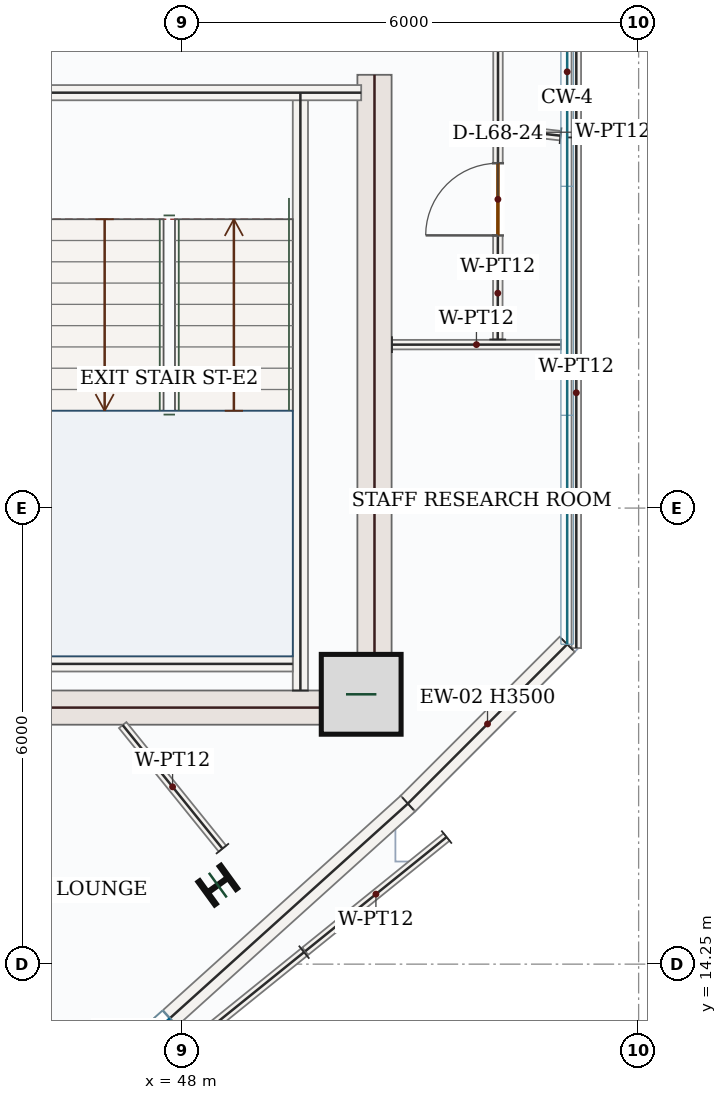
"""IFC4 building model, lengths in metres.
Left out: names, types, materials, properties, quantities, classifications, styles, units other than length and angle.
Written with IfcOpenShell. Run it as: python <this file> out.ifc"""

import sys

from ifc_helpers import new_model, si_unit, direction, frame, frame_2d, origin, origin_2d, place, context, subcontext, project, spatial, rectangle, i_section, extrude, source, transform, mapped, element, fill, save


model = new_model("IFC4")
c1 = context("Model", 3, precision=1e-05, world=origin(), true_north=direction((0.0, 1.0)))
c2 = subcontext(c1, "Body", "Model", "MODEL_VIEW")
j1 = project(units=[si_unit("LENGTHUNIT", "METRE"), si_unit("PLANEANGLEUNIT", "RADIAN")], contexts=[c1])
p1 = place(None, origin())
s1 = spatial("IfcSite", under=j1, at=p1, CompositionType="ELEMENT")
p2 = place(p1, origin())
s2 = spatial("IfcBuilding", under=s1, at=p2, CompositionType="ELEMENT")
p3 = place(p2, frame((0.0, 0.0, 284.1)))
s3 = spatial("IfcBuildingStorey", under=s2, at=p3, CompositionType="ELEMENT", Elevation=284.1)
m1 = source(origin(), c2, "Body", "SweptSolid", [
    extrude(rectangle(XDim=8.55, YDim=0.45, at=frame_2d((4.275, 0.0))), origin(), (0.0, 0.0, 1.0), 3.5),
])
p4 = place(p3, frame((50.525, 17.4, 0.0), z_axis=(0.0, 0.0, 1.0), x_axis=(0.0, 1.0, 0.0)))
e1 = element("IfcWall", 1, at=p4, inside=s3, PredefinedType="SHEAR", context=c2, shape_type="MappedRepresentation", body=[
    mapped(m1, transform((0.0, 0.0, 0.0), x_axis=(1.0, 0.0, 0.0), y_axis=(0.0, 1.0, 0.0), z_axis=(0.0, 0.0, 1.0), scale=1.0)),
])
m2 = source(origin(), c2, "Body", "SweptSolid", [
    extrude(rectangle(XDim=7.1, YDim=0.45, at=frame_2d((3.55, 0.0))), origin(), (0.0, 0.0, 1.0), 3.5),
])
p5 = place(p3, frame((43.2, 17.625, 0.0), z_axis=(0.0, 0.0, 1.0), x_axis=(1.0, 0.0, 0.0)))
e2 = element("IfcWall", 2, at=p5, inside=s3, PredefinedType="SHEAR", context=c2, shape_type="MappedRepresentation", body=[
    mapped(m2, transform((0.0, 0.0, 0.0), x_axis=(1.0, 0.0, 0.0), y_axis=(0.0, 1.0, 0.0), z_axis=(0.0, 0.0, 1.0), scale=1.0)),
])
m3 = source(origin(), c2, "Body", "SweptSolid", [
    extrude(rectangle(XDim=1.05, YDim=1.05, at=origin_2d()), origin(), (0.0, 0.0, 1.0), 3.75),
])
p6 = place(p3, frame((50.35, 17.8, 0.0), z_axis=(0.0, 0.0, 1.0), x_axis=(1.0, 0.0, 0.0)))
e3 = element("IfcColumn", 3, at=p6, inside=s3, PredefinedType="COLUMN", context=c2, shape_type="MappedRepresentation", body=[
    mapped(m3, transform((0.0, 0.0, 0.0), x_axis=(1.0, 0.0, 0.0), y_axis=(0.0, 1.0, 0.0), z_axis=(0.0, 0.0, 1.0), scale=1.0)),
])
m4 = source(origin(), c2, "Body", "SweptSolid", [
    extrude(i_section(OverallWidth=0.374, OverallDepth=0.372, WebThickness=0.016, FlangeThickness=0.026, FilletRadius=0.018, at=origin_2d()), origin(), (0.0, 0.0, 1.0), 3.75),
])
p7 = place(p3, frame((48.464, 15.289, 0.0), z_axis=(0.0, 0.0, 1.0), x_axis=(-0.587785252292, 0.809016994375, 0.0)))
e4 = element("IfcColumn", 4, at=p7, inside=s3, PredefinedType="COLUMN", context=c2, shape_type="MappedRepresentation", body=[
    mapped(m4, transform((0.0, 0.0, 0.0), x_axis=(1.0, 0.0, 0.0), y_axis=(0.0, 1.0, 0.0), z_axis=(0.0, 0.0, 1.0), scale=1.0)),
])
m5 = source(origin(), c2, "Body", "SweptSolid", [
    extrude(rectangle(XDim=2.964, YDim=0.28, at=frame_2d((1.482, 0.0))), origin(), (0.0, 0.0, 1.0), 3.5),
])
p8 = place(p3, frame((53.06, 18.458, 0.0), z_axis=(0.0, 0.0, 1.0), x_axis=(-0.707106781187, -0.707106781187, 0.0)))
e5 = element("IfcWall", 5, at=p8, inside=s3, PredefinedType="SOLIDWALL", context=c2, shape_type="MappedRepresentation", body=[
    mapped(m5, transform((0.0, 0.0, 0.0), x_axis=(1.0, 0.0, 0.0), y_axis=(0.0, 1.0, 0.0), z_axis=(0.0, 0.0, 1.0), scale=1.0)),
])
p9 = place(p3, frame((50.964, 16.362, 0.0), z_axis=(0.0, 0.0, 1.0), x_axis=(-0.742587457262, -0.669749108486, 0.0)))
e6 = element("IfcWall", 6, at=p9, inside=s3, PredefinedType="SOLIDWALL", context=c2, shape_type="SweptSolid", body=[
    extrude(rectangle(XDim=9.935, YDim=0.28, at=frame_2d((4.967, 0.0))), origin(), (0.0, 0.0, 1.0), 3.5),
])
p10 = place(p9, frame((4.217, 0.0, 0.85)))
e7 = element("IfcOpeningElement", 7, at=p10, cuts=e6, PredefinedType="OPENING", context=c2, shape_type="SweptSolid", body=[
    extrude(rectangle(XDim=1.5, YDim=1.5, at=frame_2d((0.75, 0.75))), frame((0.0, 0.15, 0.0), z_axis=(0.0, -1.0, 0.0), x_axis=(1.0, 0.0, 0.0)), (0.0, 0.0, 1.0), 0.3),
])
m6 = source(origin(), c2, "Body", "SweptSolid", [
    extrude(rectangle(XDim=7.87, YDim=0.2, at=frame_2d((3.935, 0.0))), origin(), (0.0, 0.0, 1.0), 3.5),
])
p11 = place(p3, frame((49.55, 17.85, 0.0), z_axis=(0.0, 0.0, 1.0), x_axis=(0.0, 1.0, 0.0)))
e8 = element("IfcWall", 8, at=p11, inside=s3, PredefinedType="SOLIDWALL", context=c2, shape_type="MappedRepresentation", body=[
    mapped(m6, transform((0.0, 0.0, 0.0), x_axis=(1.0, 0.0, 0.0), y_axis=(0.0, 1.0, 0.0), z_axis=(0.0, 0.0, 1.0), scale=1.0)),
])
m7 = source(origin(), c2, "Body", "SweptSolid", [
    extrude(rectangle(XDim=4.25, YDim=0.2, at=frame_2d((2.125, 0.0))), origin(), (0.0, 0.0, 1.0), 3.5),
])
p12 = place(p3, frame((46.1, 25.715, 0.0), z_axis=(0.0, 0.0, 1.0), x_axis=(1.0, 0.0, 0.0)))
e9 = element("IfcWall", 9, at=p12, inside=s3, PredefinedType="SOLIDWALL", context=c2, shape_type="MappedRepresentation", body=[
    mapped(m7, transform((0.0, 0.0, 0.0), x_axis=(1.0, 0.0, 0.0), y_axis=(0.0, 1.0, 0.0), z_axis=(0.0, 0.0, 1.0), scale=1.0)),
])
m8 = source(origin(), c2, "Body", "SweptSolid", [
    extrude(rectangle(XDim=3.25, YDim=0.2, at=frame_2d((1.625, 0.0))), origin(), (0.0, 0.0, 1.0), 3.5),
])
p13 = place(p3, frame((46.2, 18.2, 0.0), z_axis=(0.0, 0.0, 1.0), x_axis=(1.0, 0.0, 0.0)))
e10 = element("IfcWall", 10, at=p13, inside=s3, PredefinedType="SOLIDWALL", context=c2, shape_type="MappedRepresentation", body=[
    mapped(m8, transform((0.0, 0.0, 0.0), x_axis=(1.0, 0.0, 0.0), y_axis=(0.0, 1.0, 0.0), z_axis=(0.0, 0.0, 1.0), scale=1.0)),
])
m9 = source(origin(), c2, "Body", "SweptSolid", [
    extrude(rectangle(XDim=7.014, YDim=0.125, at=frame_2d((3.507, 0.0))), origin(), (0.0, 0.0, 1.0), 3.5),
])
p14 = place(p3, frame((53.18, 32.14, 0.0), z_axis=(0.0, 0.0, 1.0), x_axis=(0.0, -1.0, 0.0)))
e11 = element("IfcWall", 11, at=p14, inside=s3, PredefinedType="PARTITIONING", context=c2, shape_type="MappedRepresentation", body=[
    mapped(m9, transform((0.0, 0.0, 0.0), x_axis=(1.0, 0.0, 0.0), y_axis=(0.0, 1.0, 0.0), z_axis=(0.0, 0.0, 1.0), scale=1.0)),
])
m10 = source(origin(), c2, "Body", "SweptSolid", [
    extrude(rectangle(XDim=0.828, YDim=0.125, at=frame_2d((0.414, 0.0))), origin(), (0.0, 0.0, 1.0), 3.5),
])
p15 = place(p3, frame((52.972, 25.149, 0.0), z_axis=(0.0, 0.0, 1.0), x_axis=(-0.993862130166, 0.110625793652, 0.0)))
e12 = element("IfcWall", 12, at=p15, inside=s3, PredefinedType="PARTITIONING", context=c2, shape_type="MappedRepresentation", body=[
    mapped(m10, transform((0.0, 0.0, 0.0), x_axis=(1.0, 0.0, 0.0), y_axis=(0.0, 1.0, 0.0), z_axis=(0.0, 0.0, 1.0), scale=1.0)),
])
p16 = place(p3, frame((52.15, 25.24, 0.0), z_axis=(0.0, 0.0, 1.0), x_axis=(-0.000155231293, 0.999999987952, 0.0)))
e13 = element("IfcWall", 13, at=p16, inside=s3, PredefinedType="PARTITIONING", context=c2, shape_type="SweptSolid", body=[
    extrude(rectangle(XDim=6.291, YDim=0.125, at=frame_2d((3.146, 0.0))), origin(), (0.0, 0.0, 1.0), 3.5),
])
p17 = place(p16, frame((1.175, 0.0, 0.0)))
e14 = element("IfcOpeningElement", 14, at=p17, cuts=e13, PredefinedType="OPENING", context=c2, shape_type="SweptSolid", body=[
    extrude(rectangle(XDim=0.95, YDim=2.15, at=frame_2d((0.475, 1.075))), frame((0.0, 0.073, 0.0), z_axis=(0.0, -1.0, 0.0), x_axis=(1.0, 0.0, 0.0)), (0.0, 0.0, 1.0), 0.145),
])
m11 = source(origin(), c2, "Body", "SweptSolid", [
    extrude(rectangle(XDim=2.089, YDim=0.125, at=frame_2d((1.045, 0.0))), origin(), (0.0, 0.0, 1.0), 3.5),
])
p18 = place(p3, frame((48.525, 15.769, 0.0), z_axis=(0.0, 0.0, 1.0), x_axis=(-0.628165745158, 0.778079556735, 0.0)))
e15 = element("IfcWall", 15, at=p18, inside=s3, PredefinedType="PARTITIONING", context=c2, shape_type="MappedRepresentation", body=[
    mapped(m11, transform((0.0, 0.0, 0.0), x_axis=(1.0, 0.0, 0.0), y_axis=(0.0, 1.0, 0.0), z_axis=(0.0, 0.0, 1.0), scale=1.0)),
])
m12 = source(origin(), c2, "Body", "SweptSolid", [
    extrude(rectangle(XDim=2.223, YDim=0.125, at=frame_2d((1.111, 0.0))), origin(), (0.0, 0.0, 1.0), 3.5),
])
p19 = place(p3, frame((50.755, 22.4, 0.0), z_axis=(0.0, 0.0, 1.0), x_axis=(0.999999903478, 0.000439367269, 0.0)))
e16 = element("IfcWall", 16, at=p19, inside=s3, PredefinedType="PARTITIONING", context=c2, shape_type="MappedRepresentation", body=[
    mapped(m12, transform((0.0, 0.0, 0.0), x_axis=(1.0, 0.0, 0.0), y_axis=(0.0, 1.0, 0.0), z_axis=(0.0, 0.0, 1.0), scale=1.0)),
])
p20 = place(p3, frame((52.146, 22.468, 0.0), z_axis=(0.0, 0.0, 1.0), x_axis=(0.001263765014, 0.999999201449, 0.0)))
e17 = element("IfcWall", 17, at=p20, inside=s3, PredefinedType="PARTITIONING", context=c2, shape_type="SweptSolid", body=[
    extrude(rectangle(XDim=2.705, YDim=0.125, at=frame_2d((1.352, 0.0))), origin(), (0.0, 0.0, 1.0), 3.5),
])
p21 = place(p20, frame((1.369, 0.0, 0.0)))
e18 = element("IfcOpeningElement", 18, at=p21, cuts=e17, PredefinedType="OPENING", context=c2, shape_type="SweptSolid", body=[
    extrude(rectangle(XDim=0.95, YDim=2.15, at=frame_2d((0.475, 1.075))), frame((0.0, 0.073, 0.0), z_axis=(0.0, -1.0, 0.0), x_axis=(1.0, 0.0, 0.0)), (0.0, 0.0, 1.0), 0.145),
])
m13 = source(origin(), c2, "Body", "SweptSolid", [
    extrude(rectangle(XDim=6.718, YDim=0.125, at=frame_2d((3.359, 0.0))), origin(), (0.0, 0.0, 1.0), 3.5),
])
p22 = place(p3, frame((53.18, 25.126, 0.0), z_axis=(0.0, 0.0, 1.0), x_axis=(0.0, -1.0, 0.0)))
e19 = element("IfcWall", 19, at=p22, inside=s3, PredefinedType="PARTITIONING", context=c2, shape_type="MappedRepresentation", body=[
    mapped(m13, transform((0.0, 0.0, 0.0), x_axis=(1.0, 0.0, 0.0), y_axis=(0.0, 1.0, 0.0), z_axis=(0.0, 0.0, 1.0), scale=1.0)),
])
m14 = source(origin(), c2, "Body", "SweptSolid", [
    extrude(rectangle(XDim=2.39, YDim=0.125, at=frame_2d((1.195, 0.0))), origin(), (0.0, 0.0, 1.0), 3.5),
])
p23 = place(p3, frame((51.473, 15.922, 0.0), z_axis=(0.0, 0.0, 1.0), x_axis=(-0.778010315123, -0.628251501839, 0.0)))
e20 = element("IfcWall", 20, at=p23, inside=s3, PredefinedType="PARTITIONING", context=c2, shape_type="MappedRepresentation", body=[
    mapped(m14, transform((0.0, 0.0, 0.0), x_axis=(1.0, 0.0, 0.0), y_axis=(0.0, 1.0, 0.0), z_axis=(0.0, 0.0, 1.0), scale=1.0)),
])
m15 = source(origin(), c2, "Body", "SweptSolid", [
    extrude(rectangle(XDim=4.72, YDim=0.125, at=frame_2d((2.36, 0.0))), origin(), (0.0, 0.0, 1.0), 3.5),
])
p24 = place(p3, frame((49.598, 14.408, 0.0), z_axis=(0.0, 0.0, 1.0), x_axis=(-0.778024801452, -0.628233561922, 0.0)))
e21 = element("IfcWall", 21, at=p24, inside=s3, PredefinedType="PARTITIONING", context=c2, shape_type="MappedRepresentation", body=[
    mapped(m15, transform((0.0, 0.0, 0.0), x_axis=(1.0, 0.0, 0.0), y_axis=(0.0, 1.0, 0.0), z_axis=(0.0, 0.0, 1.0), scale=1.0)),
])
m16 = source(origin(), c2, "Body", "SweptSolid", [
    extrude(rectangle(XDim=1.5, YDim=1.5, at=frame_2d((0.75, 0.75))), frame((0.0, 0.03, 0.0), z_axis=(0.0, -1.0, 0.0), x_axis=(1.0, 0.0, 0.0)), (0.0, 0.0, 1.0), 0.06),
])
p25 = place(p10, origin())
e22 = element("IfcWindow", 22, at=p25, inside=s3, PartitioningType="SINGLE_PANEL", PredefinedType="WINDOW", context=c2, shape_type="MappedRepresentation", body=[
    mapped(m16, transform((0.0, 0.0, 0.0), x_axis=(1.0, 0.0, 0.0), y_axis=(0.0, 1.0, 0.0), z_axis=(0.0, 0.0, 1.0), scale=1.0)),
])
fill(e7, e22)
m17 = source(origin(), c2, "Body", "SweptSolid", [
    extrude(rectangle(XDim=0.95, YDim=2.15, at=frame_2d((0.475, 1.075))), frame((0.0, 0.025, 0.0), z_axis=(0.0, -1.0, 0.0), x_axis=(1.0, 0.0, 0.0)), (0.0, 0.0, 1.0), 0.05),
])
p26 = place(p21, origin())
e23 = element("IfcDoor", 23, at=p26, inside=s3, OperationType="SINGLE_SWING_LEFT", PredefinedType="DOOR", context=c2, shape_type="MappedRepresentation", body=[
    mapped(m17, transform((0.0, 0.0, 0.0), x_axis=(1.0, 0.0, 0.0), y_axis=(0.0, 1.0, 0.0), z_axis=(0.0, 0.0, 1.0), scale=1.0)),
])
fill(e18, e23)
save(model, sys.argv[1])
